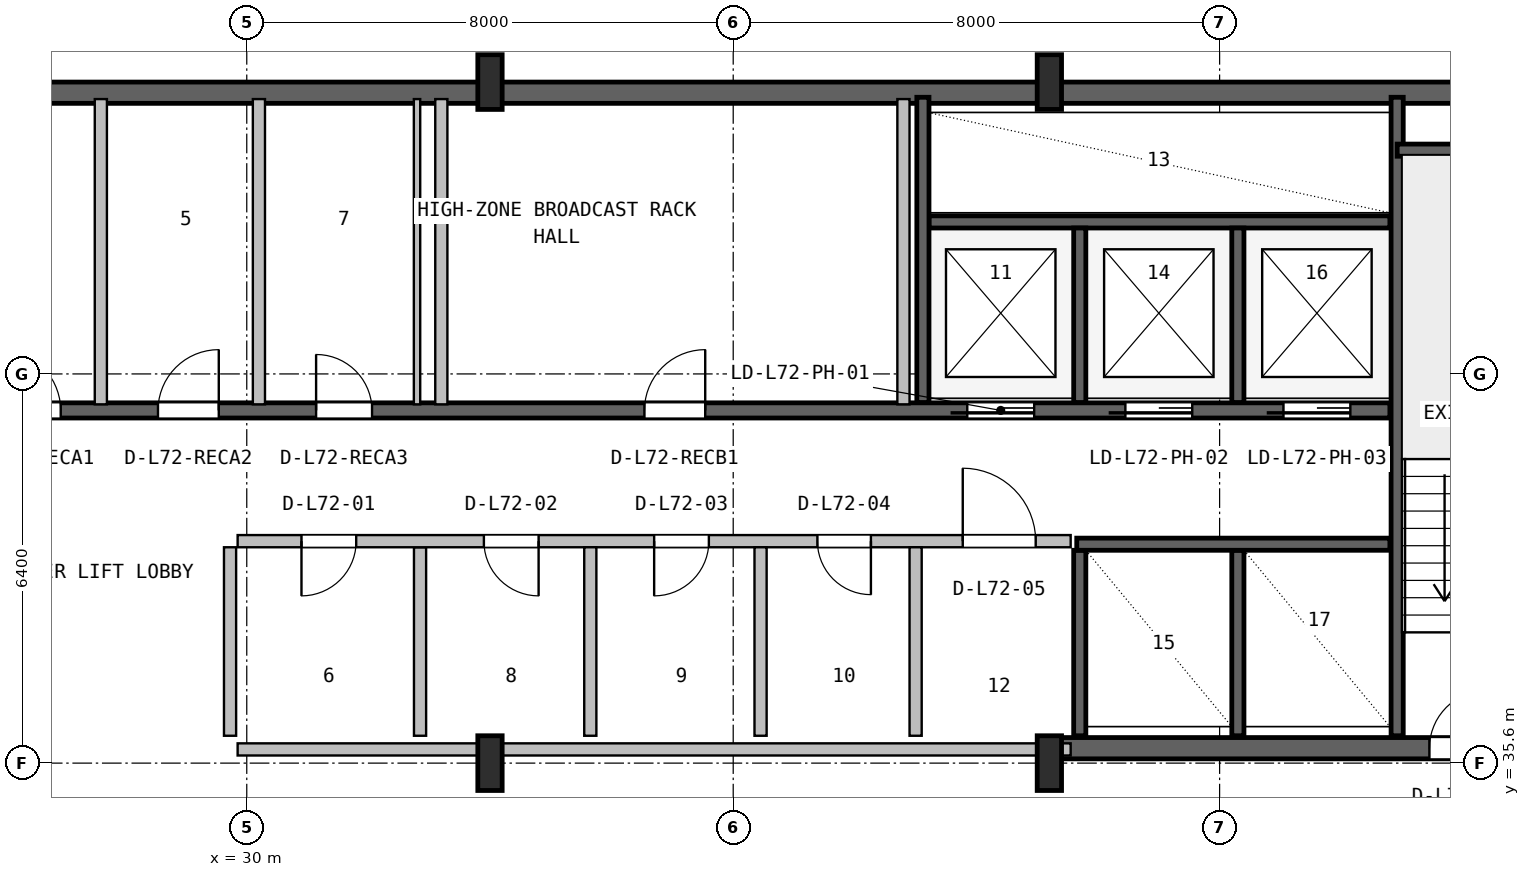
"""IFC4 building model, lengths in metres.
Left out: names, types, materials, properties, quantities, classifications, styles, units other than length and angle.
Written with IfcOpenShell. Run it as: python <this file> out.ifc"""

import sys

from ifc_helpers import new_model, si_unit, direction, frame, frame_2d, origin, origin_2d, place, context, subcontext, project, spatial, rectangle, i_section, extrude, source, transform, mapped, element, fill, save


model = new_model("IFC4")
c1 = context("Model", 3, precision=1e-05, world=origin(), true_north=direction((0.0, 1.0)))
c2 = subcontext(c1, "Body", "Model", "MODEL_VIEW")
j1 = project(units=[si_unit("LENGTHUNIT", "METRE"), si_unit("PLANEANGLEUNIT", "RADIAN")], contexts=[c1])
p1 = place(None, origin())
s1 = spatial("IfcSite", under=j1, at=p1, CompositionType="ELEMENT")
p2 = place(p1, origin())
s2 = spatial("IfcBuilding", under=s1, at=p2, CompositionType="ELEMENT")
p3 = place(p2, frame((0.0, 0.0, 288.8)))
s3 = spatial("IfcBuildingStorey", under=s2, at=p3, CompositionType="ELEMENT", Elevation=288.8)
p4 = place(p3, frame((15.325, 46.625, 0.0), z_axis=(0.0, 0.0, 1.0), x_axis=(1.0, 0.0, 0.0)))
e1 = element("IfcWall", 1, at=p4, inside=s3, PredefinedType="SHEAR", context=c2, shape_type="SweptSolid", body=[
    extrude(rectangle(XDim=37.35, YDim=0.35, at=frame_2d((18.675, 0.0))), origin(), (0.0, 0.0, 1.0), 3.55),
])
p5 = place(p3, frame((43.2, 35.845, 0.0), z_axis=(0.0, 0.0, 1.0), x_axis=(1.0, 0.0, 0.0)))
e2 = element("IfcWall", 2, at=p5, inside=s3, PredefinedType="SHEAR", context=c2, shape_type="SweptSolid", body=[
    extrude(rectangle(XDim=9.13, YDim=0.35, at=frame_2d((4.565, 0.0))), origin(), (0.0, 0.0, 1.0), 3.55),
])
p6 = place(p5, frame((6.25, 0.0, 0.0)))
e3 = element("IfcOpeningElement", 3, at=p6, cuts=e2, PredefinedType="OPENING", context=c2, shape_type="SweptSolid", body=[
    extrude(rectangle(XDim=0.95, YDim=2.1, at=frame_2d((0.475, 1.05))), frame((0.0, 0.185, 0.0), z_axis=(0.0, -1.0, 0.0), x_axis=(1.0, 0.0, 0.0)), (0.0, 0.0, 1.0), 0.37),
])
m1 = source(origin(), c2, "Body", "SweptSolid", [
    extrude(i_section(OverallWidth=0.4, OverallDepth=0.9, WebThickness=0.016, FlangeThickness=0.028, FilletRadius=0.016, at=origin_2d()), origin(), (0.0, 0.0, 1.0), 3.8),
])
for number, where, z_axis, x_axis in (
    (4, (34.0, 35.6, 0.0), (0.0, 0.0, 1.0), (1.0, 0.0, 0.0)),
    (5, (34.0, 46.8, 0.0), (0.0, 0.0, 1.0), (1.0, 0.0, 0.0)),
    (6, (43.2, 35.6, 0.0), (0.0, 0.0, 1.0), (1.0, 0.0, 0.0)),
    (7, (43.2, 46.8, 0.0), (0.0, 0.0, 1.0), (1.0, 0.0, 0.0)),
):
    element("IfcColumn", number, at=place(p3, frame(where, z_axis=z_axis, x_axis=x_axis)), inside=s3, PredefinedType="COLUMN", context=c2, shape_type="MappedRepresentation", body=[
        mapped(m1, transform((0.0, 0.0, 0.0), x_axis=(1.0, 0.0, 0.0), y_axis=(0.0, 1.0, 0.0), z_axis=(0.0, 0.0, 1.0), scale=1.0)),
    ])
p7 = place(p3, frame((48.92, 36.05, 0.0), z_axis=(0.0, 0.0, 1.0), x_axis=(0.0, 1.0, 0.0)))
e8 = element("IfcWall", 8, at=p7, inside=s3, PredefinedType="SHEAR", context=c2, shape_type="SweptSolid", body=[
    extrude(rectangle(XDim=10.5, YDim=0.2, at=frame_2d((5.25, 0.0))), origin(), (0.0, 0.0, 1.0), 3.55),
])
p8 = place(p3, frame((48.92, 45.68, 0.0), z_axis=(0.0, 0.0, 1.0), x_axis=(1.0, 0.0, 0.0)))
e9 = element("IfcWall", 9, at=p8, inside=s3, PredefinedType="SHEAR", context=c2, shape_type="SweptSolid", body=[
    extrude(rectangle(XDim=3.18, YDim=0.2, at=frame_2d((1.59, 0.0))), origin(), (0.0, 0.0, 1.0), 3.55),
])
p9 = place(p3, frame((24.98, 41.4, 0.0), z_axis=(0.0, 0.0, 1.0), x_axis=(1.0, 0.0, 0.0)))
e10 = element("IfcWall", 10, at=p9, inside=s3, PredefinedType="SHEAR", context=c2, shape_type="SweptSolid", body=[
    extrude(rectangle(XDim=23.82, YDim=0.25, at=frame_2d((11.91, 0.0))), origin(), (0.0, 0.0, 1.0), 3.55),
])
p10 = place(p9, frame((16.87, 0.0, 0.0)))
e11 = element("IfcOpeningElement", 11, at=p10, cuts=e10, PredefinedType="OPENING", context=c2, shape_type="SweptSolid", body=[
    extrude(rectangle(XDim=1.1, YDim=2.18, at=frame_2d((0.55, 1.09))), frame((0.0, 0.135, 0.0), z_axis=(0.0, -1.0, 0.0), x_axis=(1.0, 0.0, 0.0)), (0.0, 0.0, 1.0), 0.27),
])
p11 = place(p9, frame((19.47, 0.0, 0.0)))
e12 = element("IfcOpeningElement", 12, at=p11, cuts=e10, PredefinedType="OPENING", context=c2, shape_type="SweptSolid", body=[
    extrude(rectangle(XDim=1.1, YDim=2.18, at=frame_2d((0.55, 1.09))), frame((0.0, 0.135, 0.0), z_axis=(0.0, -1.0, 0.0), x_axis=(1.0, 0.0, 0.0)), (0.0, 0.0, 1.0), 0.27),
])
p12 = place(p9, frame((22.07, 0.0, 0.0)))
e13 = element("IfcOpeningElement", 13, at=p12, cuts=e10, PredefinedType="OPENING", context=c2, shape_type="SweptSolid", body=[
    extrude(rectangle(XDim=1.1, YDim=2.18, at=frame_2d((0.55, 1.09))), frame((0.0, 0.135, 0.0), z_axis=(0.0, -1.0, 0.0), x_axis=(1.0, 0.0, 0.0)), (0.0, 0.0, 1.0), 0.27),
])
p13 = place(p9, frame((0.96, 0.0, 0.0)))
e14 = element("IfcOpeningElement", 14, at=p13, cuts=e10, PredefinedType="OPENING", context=c2, shape_type="SweptSolid", body=[
    extrude(rectangle(XDim=1.0, YDim=2.08, at=frame_2d((0.5, 1.04))), frame((0.0, 0.135, 0.0), z_axis=(0.0, -1.0, 0.0), x_axis=(1.0, 0.0, 0.0)), (0.0, 0.0, 1.0), 0.27),
])
p14 = place(p9, frame((3.56, 0.0, 0.0)))
e15 = element("IfcOpeningElement", 15, at=p14, cuts=e10, PredefinedType="OPENING", context=c2, shape_type="SweptSolid", body=[
    extrude(rectangle(XDim=1.0, YDim=2.08, at=frame_2d((0.5, 1.04))), frame((0.0, 0.135, 0.0), z_axis=(0.0, -1.0, 0.0), x_axis=(1.0, 0.0, 0.0)), (0.0, 0.0, 1.0), 0.27),
])
p15 = place(p9, frame((6.16, 0.0, 0.0)))
e16 = element("IfcOpeningElement", 16, at=p15, cuts=e10, PredefinedType="OPENING", context=c2, shape_type="SweptSolid", body=[
    extrude(rectangle(XDim=0.92, YDim=2.08, at=frame_2d((0.46, 1.04))), frame((0.0, 0.135, 0.0), z_axis=(0.0, -1.0, 0.0), x_axis=(1.0, 0.0, 0.0)), (0.0, 0.0, 1.0), 0.27),
])
p16 = place(p9, frame((11.56, 0.0, 0.0)))
e17 = element("IfcOpeningElement", 17, at=p16, cuts=e10, PredefinedType="OPENING", context=c2, shape_type="SweptSolid", body=[
    extrude(rectangle(XDim=1.0, YDim=2.08, at=frame_2d((0.5, 1.04))), frame((0.0, 0.135, 0.0), z_axis=(0.0, -1.0, 0.0), x_axis=(1.0, 0.0, 0.0)), (0.0, 0.0, 1.0), 0.27),
])
p17 = place(p3, frame((41.22, 44.5, 0.0), z_axis=(0.0, 0.0, 1.0), x_axis=(1.0, 0.0, 0.0)))
e18 = element("IfcWall", 18, at=p17, inside=s3, PredefinedType="SHEAR", context=c2, shape_type="SweptSolid", body=[
    extrude(rectangle(XDim=7.58, YDim=0.2, at=frame_2d((3.79, 0.0))), origin(), (0.0, 0.0, 1.0), 3.55),
])
p18 = place(p3, frame((41.12, 41.53, 0.0), z_axis=(0.0, 0.0, 1.0), x_axis=(0.0, 1.0, 0.0)))
e19 = element("IfcWall", 19, at=p18, inside=s3, PredefinedType="SHEAR", context=c2, shape_type="SweptSolid", body=[
    extrude(rectangle(XDim=5.02, YDim=0.2, at=frame_2d((2.51, 0.0))), origin(), (0.0, 0.0, 1.0), 3.55),
])
for number, where, z_axis, x_axis in (
    (20, (43.7, 41.53, 0.0), (0.0, 0.0, 1.0), (0.0, 1.0, 0.0)),
    (21, (46.3, 41.53, 0.0), (0.0, 0.0, 1.0), (0.0, 1.0, 0.0)),
):
    element("IfcWall", number, at=place(p3, frame(where, z_axis=z_axis, x_axis=x_axis)), inside=s3, PredefinedType="SHEAR", context=c2, shape_type="SweptSolid", body=[
        extrude(rectangle(XDim=2.87, YDim=0.2, at=frame_2d((1.435, 0.0))), origin(), (0.0, 0.0, 1.0), 3.55),
    ])
for number, where, z_axis, x_axis in (
    (22, (43.7, 36.05, 0.0), (0.0, 0.0, 1.0), (0.0, 1.0, 0.0)),
    (23, (46.3, 36.05, 0.0), (0.0, 0.0, 1.0), (0.0, 1.0, 0.0)),
):
    element("IfcWall", number, at=place(p3, frame(where, z_axis=z_axis, x_axis=x_axis)), inside=s3, PredefinedType="SHEAR", context=c2, shape_type="SweptSolid", body=[
        extrude(rectangle(XDim=3.05, YDim=0.2, at=frame_2d((1.525, 0.0))), origin(), (0.0, 0.0, 1.0), 3.55),
    ])
p19 = place(p3, frame((43.65, 39.2, 0.0), z_axis=(0.0, 0.0, 1.0), x_axis=(1.0, 0.0, 0.0)))
e24 = element("IfcWall", 24, at=p19, inside=s3, PredefinedType="SHEAR", context=c2, shape_type="SweptSolid", body=[
    extrude(rectangle(XDim=5.15, YDim=0.2, at=frame_2d((2.575, 0.0))), origin(), (0.0, 0.0, 1.0), 3.55),
])
p20 = place(p3, frame((29.85, 35.825, 0.0), z_axis=(0.0, 0.0, 1.0), x_axis=(1.0, 0.0, 0.0)))
e25 = element("IfcWall", 25, at=p20, inside=s3, PredefinedType="SOLIDWALL", context=c2, shape_type="SweptSolid", body=[
    extrude(rectangle(XDim=13.7, YDim=0.2, at=frame_2d((6.85, 0.0))), origin(), (0.0, 0.0, 1.0), 2.575),
])
p21 = place(p3, frame((32.85, 36.05, 0.0), z_axis=(0.0, 0.0, 1.0), x_axis=(0.0, 1.0, 0.0)))
e26 = element("IfcWall", 26, at=p21, inside=s3, PredefinedType="PLUMBINGWALL", context=c2, shape_type="SweptSolid", body=[
    extrude(rectangle(XDim=3.1, YDim=0.2, at=frame_2d((1.55, 0.0))), origin(), (0.0, 0.0, 1.0), 3.53),
])
p22 = place(p3, frame((29.85, 39.25, 0.0), z_axis=(0.0, 0.0, 1.0), x_axis=(1.0, 0.0, 0.0)))
e27 = element("IfcWall", 27, at=p22, inside=s3, PredefinedType="SOLIDWALL", context=c2, shape_type="SweptSolid", body=[
    extrude(rectangle(XDim=13.7, YDim=0.2, at=frame_2d((6.85, 0.0))), origin(), (0.0, 0.0, 1.0), 3.53),
])
p23 = place(p22, frame((1.05, 0.0, 0.0)))
e28 = element("IfcOpeningElement", 28, at=p23, cuts=e27, PredefinedType="OPENING", context=c2, shape_type="SweptSolid", body=[
    extrude(rectangle(XDim=0.9, YDim=2.06, at=frame_2d((0.45, 1.03))), frame((0.0, 0.11, 0.0), z_axis=(0.0, -1.0, 0.0), x_axis=(1.0, 0.0, 0.0)), (0.0, 0.0, 1.0), 0.22),
])
p24 = place(p22, frame((4.05, 0.0, 0.0)))
e29 = element("IfcOpeningElement", 29, at=p24, cuts=e27, PredefinedType="OPENING", context=c2, shape_type="SweptSolid", body=[
    extrude(rectangle(XDim=0.9, YDim=2.06, at=frame_2d((0.45, 1.03))), frame((0.0, 0.11, 0.0), z_axis=(0.0, -1.0, 0.0), x_axis=(1.0, 0.0, 0.0)), (0.0, 0.0, 1.0), 0.22),
])
p25 = place(p22, frame((6.85, 0.0, 0.0)))
e30 = element("IfcOpeningElement", 30, at=p25, cuts=e27, PredefinedType="OPENING", context=c2, shape_type="SweptSolid", body=[
    extrude(rectangle(XDim=0.9, YDim=2.06, at=frame_2d((0.45, 1.03))), frame((0.0, 0.11, 0.0), z_axis=(0.0, -1.0, 0.0), x_axis=(1.0, 0.0, 0.0)), (0.0, 0.0, 1.0), 0.22),
])
p26 = place(p22, frame((9.535, 0.0, 0.0)))
e31 = element("IfcOpeningElement", 31, at=p26, cuts=e27, PredefinedType="OPENING", context=c2, shape_type="SweptSolid", body=[
    extrude(rectangle(XDim=0.88, YDim=2.06, at=frame_2d((0.44, 1.03))), frame((0.0, 0.11, 0.0), z_axis=(0.0, -1.0, 0.0), x_axis=(1.0, 0.0, 0.0)), (0.0, 0.0, 1.0), 0.22),
])
p27 = place(p22, frame((11.925, 0.0, 0.0)))
e32 = element("IfcOpeningElement", 32, at=p27, cuts=e27, PredefinedType="OPENING", context=c2, shape_type="SweptSolid", body=[
    extrude(rectangle(XDim=1.2, YDim=2.1, at=frame_2d((0.6, 1.05))), frame((0.0, 0.11, 0.0), z_axis=(0.0, -1.0, 0.0), x_axis=(1.0, 0.0, 0.0)), (0.0, 0.0, 1.0), 0.22),
])
for number, where, z_axis, x_axis in (
    (33, (29.725, 36.05, 0.0), (0.0, 0.0, 1.0), (0.0, 1.0, 0.0)),
    (34, (35.65, 36.05, 0.0), (0.0, 0.0, 1.0), (0.0, 1.0, 0.0)),
    (35, (38.45, 36.05, 0.0), (0.0, 0.0, 1.0), (0.0, 1.0, 0.0)),
):
    element("IfcWall", number, at=place(p3, frame(where, z_axis=z_axis, x_axis=x_axis)), inside=s3, PredefinedType="PLUMBINGWALL", context=c2, shape_type="SweptSolid", body=[
        extrude(rectangle(XDim=3.1, YDim=0.2, at=frame_2d((1.55, 0.0))), origin(), (0.0, 0.0, 1.0), 3.53),
    ])
p28 = place(p3, frame((41.0, 36.05, 0.0), z_axis=(0.0, 0.0, 1.0), x_axis=(0.0, 1.0, 0.0)))
e36 = element("IfcWall", 36, at=p28, inside=s3, PredefinedType="SOLIDWALL", context=c2, shape_type="SweptSolid", body=[
    extrude(rectangle(XDim=3.1, YDim=0.2, at=frame_2d((1.55, 0.0))), origin(), (0.0, 0.0, 1.0), 3.53),
])
for number, where, z_axis, x_axis in (
    (37, (27.6, 41.5, 0.0), (0.0, 0.0, 1.0), (0.0, 1.0, 0.0)),
    (38, (30.2, 41.5, 0.0), (0.0, 0.0, 1.0), (0.0, 1.0, 0.0)),
):
    element("IfcWall", number, at=place(p3, frame(where, z_axis=z_axis, x_axis=x_axis)), inside=s3, PredefinedType="SOLIDWALL", context=c2, shape_type="SweptSolid", body=[
        extrude(rectangle(XDim=5.02, YDim=0.2, at=frame_2d((2.51, 0.0))), origin(), (0.0, 0.0, 1.0), 3.53),
    ])
p29 = place(p3, frame((32.8, 41.5, 0.0), z_axis=(0.0, 0.0, 1.0), x_axis=(0.0, 1.0, 0.0)))
e39 = element("IfcWall", 39, at=p29, inside=s3, PredefinedType="PARTITIONING", context=c2, shape_type="SweptSolid", body=[
    extrude(rectangle(XDim=5.02, YDim=0.105, at=frame_2d((2.51, 0.0))), origin(), (0.0, 0.0, 1.0), 3.53),
])
for number, where, z_axis, x_axis in (
    (40, (40.8, 41.5, 0.0), (0.0, 0.0, 1.0), (0.0, 1.0, 0.0)),
    (41, (33.2, 41.5, 0.0), (0.0, 0.0, 1.0), (0.0, 1.0, 0.0)),
):
    element("IfcWall", number, at=place(p3, frame(where, z_axis=z_axis, x_axis=x_axis)), inside=s3, PredefinedType="SOLIDWALL", context=c2, shape_type="SweptSolid", body=[
        extrude(rectangle(XDim=5.02, YDim=0.2, at=frame_2d((2.51, 0.0))), origin(), (0.0, 0.0, 1.0), 3.53),
    ])
m2 = source(origin(), c2, "Body", "SweptSolid", [
    extrude(rectangle(XDim=0.95, YDim=2.1, at=frame_2d((0.475, 1.05))), frame((0.0, 0.025, 0.0), z_axis=(0.0, -1.0, 0.0), x_axis=(1.0, 0.0, 0.0)), (0.0, 0.0, 1.0), 0.05),
])
p30 = place(p6, origin())
e42 = element("IfcDoor", 42, at=p30, inside=s3, OperationType="SINGLE_SWING_RIGHT", PredefinedType="DOOR", context=c2, shape_type="MappedRepresentation", body=[
    mapped(m2, transform((0.0, 0.0, 0.0), x_axis=(1.0, 0.0, 0.0), y_axis=(0.0, 1.0, 0.0), z_axis=(0.0, 0.0, 1.0), scale=1.0)),
])
fill(e3, e42)
m3 = source(origin(), c2, "Body", "SweptSolid", [
    extrude(rectangle(XDim=1.1, YDim=2.18, at=frame_2d((0.55, 1.09))), frame((0.0, 0.025, 0.0), z_axis=(0.0, -1.0, 0.0), x_axis=(1.0, 0.0, 0.0)), (0.0, 0.0, 1.0), 0.05),
])
p31 = place(p10, frame((1.1, 0.0, 0.0), z_axis=(0.0, 0.0, 1.0), x_axis=(-1.0, 0.0, 0.0)))
e43 = element("IfcDoor", 43, at=p31, inside=s3, OperationType="SLIDING_TO_LEFT", PredefinedType="DOOR", context=c2, shape_type="MappedRepresentation", body=[
    mapped(m3, transform((0.0, 0.0, 0.0), x_axis=(1.0, 0.0, 0.0), y_axis=(0.0, 1.0, 0.0), z_axis=(0.0, 0.0, 1.0), scale=1.0)),
])
fill(e11, e43)
p32 = place(p11, frame((1.1, 0.0, 0.0), z_axis=(0.0, 0.0, 1.0), x_axis=(-1.0, 0.0, 0.0)))
e44 = element("IfcDoor", 44, at=p32, inside=s3, OperationType="SLIDING_TO_LEFT", PredefinedType="DOOR", context=c2, shape_type="MappedRepresentation", body=[
    mapped(m3, transform((0.0, 0.0, 0.0), x_axis=(1.0, 0.0, 0.0), y_axis=(0.0, 1.0, 0.0), z_axis=(0.0, 0.0, 1.0), scale=1.0)),
])
fill(e12, e44)
p33 = place(p12, frame((1.1, 0.0, 0.0), z_axis=(0.0, 0.0, 1.0), x_axis=(-1.0, 0.0, 0.0)))
e45 = element("IfcDoor", 45, at=p33, inside=s3, OperationType="SLIDING_TO_LEFT", PredefinedType="DOOR", context=c2, shape_type="MappedRepresentation", body=[
    mapped(m3, transform((0.0, 0.0, 0.0), x_axis=(1.0, 0.0, 0.0), y_axis=(0.0, 1.0, 0.0), z_axis=(0.0, 0.0, 1.0), scale=1.0)),
])
fill(e13, e45)
m4 = source(origin(), c2, "Body", "SweptSolid", [
    extrude(rectangle(XDim=1.0, YDim=2.08, at=frame_2d((0.5, 1.04))), frame((0.0, 0.025, 0.0), z_axis=(0.0, -1.0, 0.0), x_axis=(1.0, 0.0, 0.0)), (0.0, 0.0, 1.0), 0.05),
])
p34 = place(p13, origin())
e46 = element("IfcDoor", 46, at=p34, inside=s3, OperationType="SINGLE_SWING_LEFT", PredefinedType="DOOR", context=c2, shape_type="MappedRepresentation", body=[
    mapped(m4, transform((0.0, 0.0, 0.0), x_axis=(1.0, 0.0, 0.0), y_axis=(0.0, 1.0, 0.0), z_axis=(0.0, 0.0, 1.0), scale=1.0)),
])
fill(e14, e46)
p35 = place(p14, origin())
e47 = element("IfcDoor", 47, at=p35, inside=s3, OperationType="SINGLE_SWING_RIGHT", PredefinedType="DOOR", context=c2, shape_type="MappedRepresentation", body=[
    mapped(m4, transform((0.0, 0.0, 0.0), x_axis=(1.0, 0.0, 0.0), y_axis=(0.0, 1.0, 0.0), z_axis=(0.0, 0.0, 1.0), scale=1.0)),
])
fill(e15, e47)
m5 = source(origin(), c2, "Body", "SweptSolid", [
    extrude(rectangle(XDim=0.92, YDim=2.08, at=frame_2d((0.46, 1.04))), frame((0.0, 0.025, 0.0), z_axis=(0.0, -1.0, 0.0), x_axis=(1.0, 0.0, 0.0)), (0.0, 0.0, 1.0), 0.05),
])
p36 = place(p15, origin())
e48 = element("IfcDoor", 48, at=p36, inside=s3, OperationType="SINGLE_SWING_LEFT", PredefinedType="DOOR", context=c2, shape_type="MappedRepresentation", body=[
    mapped(m5, transform((0.0, 0.0, 0.0), x_axis=(1.0, 0.0, 0.0), y_axis=(0.0, 1.0, 0.0), z_axis=(0.0, 0.0, 1.0), scale=1.0)),
])
fill(e16, e48)
p37 = place(p16, origin())
e49 = element("IfcDoor", 49, at=p37, inside=s3, OperationType="SINGLE_SWING_RIGHT", PredefinedType="DOOR", context=c2, shape_type="MappedRepresentation", body=[
    mapped(m4, transform((0.0, 0.0, 0.0), x_axis=(1.0, 0.0, 0.0), y_axis=(0.0, 1.0, 0.0), z_axis=(0.0, 0.0, 1.0), scale=1.0)),
])
fill(e17, e49)
m6 = source(origin(), c2, "Body", "SweptSolid", [
    extrude(rectangle(XDim=0.9, YDim=2.06, at=frame_2d((0.45, 1.03))), frame((0.0, 0.025, 0.0), z_axis=(0.0, -1.0, 0.0), x_axis=(1.0, 0.0, 0.0)), (0.0, 0.0, 1.0), 0.05),
])
p38 = place(p23, frame((0.9, 0.0, 0.0), z_axis=(0.0, 0.0, 1.0), x_axis=(-1.0, 0.0, 0.0)))
e50 = element("IfcDoor", 50, at=p38, inside=s3, OperationType="SINGLE_SWING_LEFT", PredefinedType="DOOR", context=c2, shape_type="MappedRepresentation", body=[
    mapped(m6, transform((0.0, 0.0, 0.0), x_axis=(1.0, 0.0, 0.0), y_axis=(0.0, 1.0, 0.0), z_axis=(0.0, 0.0, 1.0), scale=1.0)),
])
fill(e28, e50)
p39 = place(p24, frame((0.9, 0.0, 0.0), z_axis=(0.0, 0.0, 1.0), x_axis=(-1.0, 0.0, 0.0)))
e51 = element("IfcDoor", 51, at=p39, inside=s3, OperationType="SINGLE_SWING_RIGHT", PredefinedType="DOOR", context=c2, shape_type="MappedRepresentation", body=[
    mapped(m6, transform((0.0, 0.0, 0.0), x_axis=(1.0, 0.0, 0.0), y_axis=(0.0, 1.0, 0.0), z_axis=(0.0, 0.0, 1.0), scale=1.0)),
])
fill(e29, e51)
p40 = place(p25, frame((0.9, 0.0, 0.0), z_axis=(0.0, 0.0, 1.0), x_axis=(-1.0, 0.0, 0.0)))
e52 = element("IfcDoor", 52, at=p40, inside=s3, OperationType="SINGLE_SWING_LEFT", PredefinedType="DOOR", context=c2, shape_type="MappedRepresentation", body=[
    mapped(m6, transform((0.0, 0.0, 0.0), x_axis=(1.0, 0.0, 0.0), y_axis=(0.0, 1.0, 0.0), z_axis=(0.0, 0.0, 1.0), scale=1.0)),
])
fill(e30, e52)
m7 = source(origin(), c2, "Body", "SweptSolid", [
    extrude(rectangle(XDim=0.88, YDim=2.06, at=frame_2d((0.44, 1.03))), frame((0.0, 0.025, 0.0), z_axis=(0.0, -1.0, 0.0), x_axis=(1.0, 0.0, 0.0)), (0.0, 0.0, 1.0), 0.05),
])
p41 = place(p26, frame((0.88, 0.0, 0.0), z_axis=(0.0, 0.0, 1.0), x_axis=(-1.0, 0.0, 0.0)))
e53 = element("IfcDoor", 53, at=p41, inside=s3, OperationType="SINGLE_SWING_RIGHT", PredefinedType="DOOR", context=c2, shape_type="MappedRepresentation", body=[
    mapped(m7, transform((0.0, 0.0, 0.0), x_axis=(1.0, 0.0, 0.0), y_axis=(0.0, 1.0, 0.0), z_axis=(0.0, 0.0, 1.0), scale=1.0)),
])
fill(e31, e53)
m8 = source(origin(), c2, "Body", "SweptSolid", [
    extrude(rectangle(XDim=1.2, YDim=2.1, at=frame_2d((0.6, 1.05))), frame((0.0, 0.025, 0.0), z_axis=(0.0, -1.0, 0.0), x_axis=(1.0, 0.0, 0.0)), (0.0, 0.0, 1.0), 0.05),
])
p42 = place(p27, origin())
e54 = element("IfcDoor", 54, at=p42, inside=s3, OperationType="SINGLE_SWING_LEFT", PredefinedType="DOOR", context=c2, shape_type="MappedRepresentation", body=[
    mapped(m8, transform((0.0, 0.0, 0.0), x_axis=(1.0, 0.0, 0.0), y_axis=(0.0, 1.0, 0.0), z_axis=(0.0, 0.0, 1.0), scale=1.0)),
])
fill(e32, e54)
save(model, sys.argv[1])
